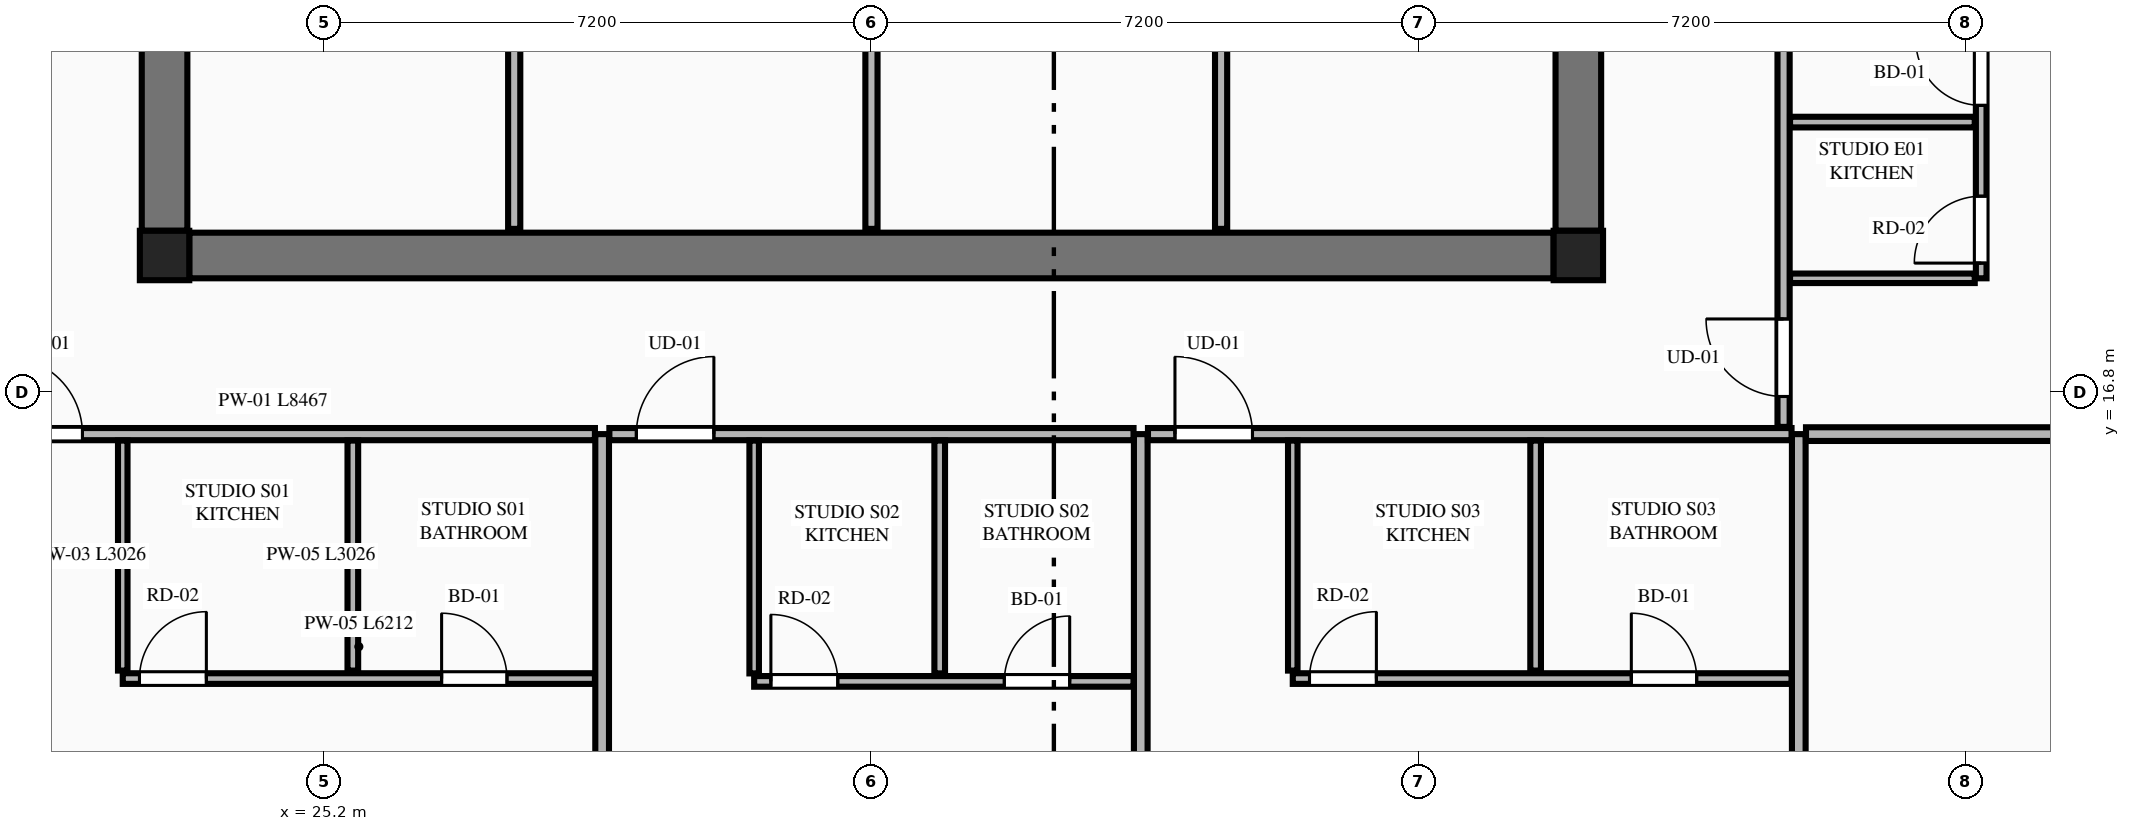
"""IFC4 building model, lengths in metres.
Left out: names, types, materials, properties, quantities, classifications, styles, units other than length and angle.
Written with IfcOpenShell. Run it as: python <this file> out.ifc"""

import sys

from ifc_helpers import new_model, si_unit, direction, frame, frame_2d, origin, origin_2d, place, context, subcontext, project, spatial, rectangle, extrude, element, fill, save


model = new_model("IFC4")
c1 = context("Model", 3, precision=1e-05, world=origin(), true_north=direction((0.0, 1.0)))
c2 = subcontext(c1, "Body", "Model", "MODEL_VIEW")
j1 = project(units=[si_unit("LENGTHUNIT", "METRE"), si_unit("PLANEANGLEUNIT", "RADIAN")], contexts=[c1])
p1 = place(None, origin())
s1 = spatial("IfcSite", under=j1, at=p1, CompositionType="ELEMENT")
p2 = place(p1, origin())
s2 = spatial("IfcBuilding", under=s1, at=p2, CompositionType="ELEMENT")
p3 = place(p2, frame((0.0, 0.0, 200.3)))
s3 = spatial("IfcBuildingStorey", under=s2, at=p3, CompositionType="ELEMENT", Elevation=200.3)
for number, where, z_axis, x_axis in (
    (1, (23.1, 18.6, 0.0), (0.0, 0.0, 1.0), (1.0, 0.0, 0.0)),
    (2, (41.7, 18.6, 0.0), (0.0, 0.0, 1.0), (1.0, 0.0, 0.0)),
):
    element("IfcColumn", number, at=place(p3, frame(where, z_axis=z_axis, x_axis=x_axis)), inside=s3, PredefinedType="COLUMN", context=c2, shape_type="SweptSolid", body=[
        extrude(rectangle(XDim=0.65, YDim=0.65, at=origin_2d()), origin(), (0.0, 0.0, 1.0), 3.55),
    ])
p4 = place(p3, frame((23.425, 18.6, 0.0), z_axis=(0.0, 0.0, 1.0), x_axis=(1.0, 0.0, 0.0)))
e3 = element("IfcWall", 3, at=p4, inside=s3, PredefinedType="SHEAR", context=c2, shape_type="SweptSolid", body=[
    extrude(rectangle(XDim=17.95, YDim=0.6, at=frame_2d((8.975, 0.0))), origin(), (0.0, 0.0, 1.0), 3.35),
])
p5 = place(p3, frame((23.1, 18.925, 0.0), z_axis=(0.0, 0.0, 1.0), x_axis=(0.0, 1.0, 0.0)))
e4 = element("IfcWall", 4, at=p5, inside=s3, PredefinedType="SHEAR", context=c2, shape_type="SweptSolid", body=[
    extrude(rectangle(XDim=13.95, YDim=0.6, at=frame_2d((6.975, 0.0))), origin(), (0.0, 0.0, 1.0), 3.35),
])
p6 = place(p5, frame((2.915, 0.0, 0.0)))
e5 = element("IfcOpeningElement", 5, at=p6, cuts=e4, PredefinedType="OPENING", context=c2, shape_type="SweptSolid", body=[
    extrude(rectangle(XDim=1.22, YDim=2.25, at=frame_2d((0.61, 1.125))), frame((0.0, 0.31, 0.0), z_axis=(0.0, -1.0, 0.0), x_axis=(1.0, 0.0, 0.0)), (0.0, 0.0, 1.0), 0.62),
])
p7 = place(p3, frame((41.7, 18.925, 0.0), z_axis=(0.0, 0.0, 1.0), x_axis=(0.0, 1.0, 0.0)))
e6 = element("IfcWall", 6, at=p7, inside=s3, PredefinedType="SHEAR", context=c2, shape_type="SweptSolid", body=[
    extrude(rectangle(XDim=13.95, YDim=0.6, at=frame_2d((6.975, 0.0))), origin(), (0.0, 0.0, 1.0), 3.35),
])
p8 = place(p7, frame((2.915, 0.0, 0.0)))
e7 = element("IfcOpeningElement", 7, at=p8, cuts=e6, PredefinedType="OPENING", context=c2, shape_type="SweptSolid", body=[
    extrude(rectangle(XDim=1.22, YDim=2.25, at=frame_2d((0.61, 1.125))), frame((0.0, 0.31, 0.0), z_axis=(0.0, -1.0, 0.0), x_axis=(1.0, 0.0, 0.0)), (0.0, 0.0, 1.0), 0.62),
])
for number, where, z_axis, x_axis in (
    (8, (27.7, 18.95, 0.0), (0.0, 0.0, 1.0), (0.0, 1.0, 0.0)),
    (9, (32.4, 18.95, 0.0), (0.0, 0.0, 1.0), (0.0, 1.0, 0.0)),
    (10, (37.0, 18.95, 0.0), (0.0, 0.0, 1.0), (0.0, 1.0, 0.0)),
):
    element("IfcWall", number, at=place(p3, frame(where, z_axis=z_axis, x_axis=x_axis)), inside=s3, PredefinedType="PARTITIONING", context=c2, shape_type="SweptSolid", body=[
        extrude(rectangle(XDim=2.73, YDim=0.16, at=frame_2d((1.365, 0.0))), origin(), (0.0, 0.0, 1.0), 3.35),
    ])
p9 = place(p3, frame((46.783, 8.249, 0.0), z_axis=(0.0, 0.0, 1.0), x_axis=(0.451522864045, 0.892259549259, 0.0)))
e11 = element("IfcWall", 11, at=p9, inside=s3, PredefinedType="STANDARD", context=c2, shape_type="SweptSolid", body=[
    extrude(rectangle(XDim=4.731, YDim=0.34, at=frame_2d((2.365, 0.0))), origin(), (0.0, 0.0, 1.0), 2.883),
])
p10 = place(p9, frame((1.815, 0.0, 0.75)))
e12 = element("IfcOpeningElement", 12, at=p10, cuts=e11, PredefinedType="OPENING", context=c2, shape_type="SweptSolid", body=[
    extrude(rectangle(XDim=1.1, YDim=1.983, at=frame_2d((0.55, 0.991))), frame((0.0, 0.18, 0.0), z_axis=(0.0, -1.0, 0.0), x_axis=(1.0, 0.0, 0.0)), (0.0, 0.0, 1.0), 0.36),
])
for number, where, z_axis, x_axis in (
    (13, (28.857, 5.755, 0.0), (0.0, 0.0, 1.0), (0.0, 1.0, 0.0)),
    (14, (35.943, 5.755, 0.0), (0.0, 0.0, 1.0), (0.0, 1.0, 0.0)),
):
    element("IfcWall", number, at=place(p3, frame(where, z_axis=z_axis, x_axis=x_axis)), inside=s3, PredefinedType="PARTITIONING", context=c2, shape_type="SweptSolid", body=[
        extrude(rectangle(XDim=10.495, YDim=0.18, at=frame_2d((5.248, 0.0))), origin(), (0.0, 0.0, 1.0), 2.807),
    ])
p11 = place(p3, frame((44.6, 5.968, 0.0), z_axis=(0.0, 0.0, 1.0), x_axis=(0.0, 1.0, 0.0)))
e15 = element("IfcWall", 15, at=p11, inside=s3, PredefinedType="PARTITIONING", context=c2, shape_type="SweptSolid", body=[
    extrude(rectangle(XDim=10.282, YDim=0.18, at=frame_2d((5.141, 0.0))), origin(), (0.0, 0.0, 1.0), 3.35),
])
p12 = place(p3, frame((20.295, 16.25, 0.0), z_axis=(0.0, 0.0, 1.0), x_axis=(1.0, 0.0, 0.0)))
e16 = element("IfcWall", 16, at=p12, inside=s3, PredefinedType="PARTITIONING", context=c2, shape_type="SweptSolid", body=[
    extrude(rectangle(XDim=8.467, YDim=0.16, at=frame_2d((4.233, 0.0))), origin(), (0.0, 0.0, 1.0), 3.35),
])
p13 = place(p12, frame((0.705, 0.0, 0.0)))
e17 = element("IfcOpeningElement", 17, at=p13, cuts=e16, PredefinedType="OPENING", context=c2, shape_type="SweptSolid", body=[
    extrude(rectangle(XDim=1.02, YDim=2.25, at=frame_2d((0.51, 1.125))), frame((0.0, 0.09, 0.0), z_axis=(0.0, -1.0, 0.0), x_axis=(1.0, 0.0, 0.0)), (0.0, 0.0, 1.0), 0.18),
])
p14 = place(p3, frame((22.55, 13.139, 0.0), z_axis=(0.0, 0.0, 1.0), x_axis=(0.0, 1.0, 0.0)))
e18 = element("IfcWall", 18, at=p14, inside=s3, PredefinedType="PARTITIONING", context=c2, shape_type="SweptSolid", body=[
    extrude(rectangle(XDim=3.026, YDim=0.125, at=frame_2d((1.513, 0.0))), origin(), (0.0, 0.0, 1.0), 2.807),
])
p15 = place(p3, frame((22.55, 13.034, 0.0), z_axis=(0.0, 0.0, 1.0), x_axis=(1.0, 0.0, 0.0)))
e19 = element("IfcWall", 19, at=p15, inside=s3, PredefinedType="PLUMBINGWALL", context=c2, shape_type="SweptSolid", body=[
    extrude(rectangle(XDim=6.212, YDim=0.14, at=frame_2d((3.106, 0.0))), origin(), (0.0, 0.0, 1.0), 3.35),
])
p16 = place(p15, frame((4.195, 0.0, 0.0)))
e20 = element("IfcOpeningElement", 20, at=p16, cuts=e19, PredefinedType="OPENING", context=c2, shape_type="SweptSolid", body=[
    extrude(rectangle(XDim=0.86, YDim=2.1, at=frame_2d((0.43, 1.05))), frame((0.0, 0.08, 0.0), z_axis=(0.0, -1.0, 0.0), x_axis=(1.0, 0.0, 0.0)), (0.0, 0.0, 1.0), 0.16),
])
p17 = place(p15, frame((0.22, 0.0, 0.0)))
e21 = element("IfcOpeningElement", 21, at=p17, cuts=e19, PredefinedType="OPENING", context=c2, shape_type="SweptSolid", body=[
    extrude(rectangle(XDim=0.88, YDim=2.15, at=frame_2d((0.44, 1.075))), frame((0.0, 0.08, 0.0), z_axis=(0.0, -1.0, 0.0), x_axis=(1.0, 0.0, 0.0)), (0.0, 0.0, 1.0), 0.16),
])
p18 = place(p3, frame((25.577, 13.139, 0.0), z_axis=(0.0, 0.0, 1.0), x_axis=(0.0, 1.0, 0.0)))
e22 = element("IfcWall", 22, at=p18, inside=s3, PredefinedType="PLUMBINGWALL", context=c2, shape_type="SweptSolid", body=[
    extrude(rectangle(XDim=3.026, YDim=0.14, at=frame_2d((1.513, 0.0))), origin(), (0.0, 0.0, 1.0), 3.35),
])
p19 = place(p3, frame((28.952, 16.25, 0.0), z_axis=(0.0, 0.0, 1.0), x_axis=(1.0, 0.0, 0.0)))
e23 = element("IfcWall", 23, at=p19, inside=s3, PredefinedType="PARTITIONING", context=c2, shape_type="SweptSolid", body=[
    extrude(rectangle(XDim=6.896, YDim=0.16, at=frame_2d((3.448, 0.0))), origin(), (0.0, 0.0, 1.0), 3.35),
])
p20 = place(p19, frame((0.355, 0.0, 0.0)))
e24 = element("IfcOpeningElement", 24, at=p20, cuts=e23, PredefinedType="OPENING", context=c2, shape_type="SweptSolid", body=[
    extrude(rectangle(XDim=1.02, YDim=2.25, at=frame_2d((0.51, 1.125))), frame((0.0, 0.09, 0.0), z_axis=(0.0, -1.0, 0.0), x_axis=(1.0, 0.0, 0.0)), (0.0, 0.0, 1.0), 0.18),
])
p21 = place(p3, frame((30.857, 13.102, 0.0), z_axis=(0.0, 0.0, 1.0), x_axis=(0.0, 1.0, 0.0)))
e25 = element("IfcWall", 25, at=p21, inside=s3, PredefinedType="PARTITIONING", context=c2, shape_type="SweptSolid", body=[
    extrude(rectangle(XDim=3.063, YDim=0.125, at=frame_2d((1.531, 0.0))), origin(), (0.0, 0.0, 1.0), 3.35),
])
p22 = place(p3, frame((30.857, 12.997, 0.0), z_axis=(0.0, 0.0, 1.0), x_axis=(1.0, 0.0, 0.0)))
e26 = element("IfcWall", 26, at=p22, inside=s3, PredefinedType="PLUMBINGWALL", context=c2, shape_type="SweptSolid", body=[
    extrude(rectangle(XDim=4.991, YDim=0.14, at=frame_2d((2.496, 0.0))), origin(), (0.0, 0.0, 1.0), 3.35),
])
p23 = place(p22, frame((3.291, 0.0, 0.0)))
e27 = element("IfcOpeningElement", 27, at=p23, cuts=e26, PredefinedType="OPENING", context=c2, shape_type="SweptSolid", body=[
    extrude(rectangle(XDim=0.86, YDim=2.1, at=frame_2d((0.43, 1.05))), frame((0.0, 0.08, 0.0), z_axis=(0.0, -1.0, 0.0), x_axis=(1.0, 0.0, 0.0)), (0.0, 0.0, 1.0), 0.16),
])
p24 = place(p22, frame((0.22, 0.0, 0.0)))
e28 = element("IfcOpeningElement", 28, at=p24, cuts=e26, PredefinedType="OPENING", context=c2, shape_type="SweptSolid", body=[
    extrude(rectangle(XDim=0.88, YDim=2.15, at=frame_2d((0.44, 1.075))), frame((0.0, 0.08, 0.0), z_axis=(0.0, -1.0, 0.0), x_axis=(1.0, 0.0, 0.0)), (0.0, 0.0, 1.0), 0.16),
])
p25 = place(p3, frame((33.298, 13.102, 0.0), z_axis=(0.0, 0.0, 1.0), x_axis=(0.0, 1.0, 0.0)))
e29 = element("IfcWall", 29, at=p25, inside=s3, PredefinedType="PLUMBINGWALL", context=c2, shape_type="SweptSolid", body=[
    extrude(rectangle(XDim=3.063, YDim=0.14, at=frame_2d((1.531, 0.0))), origin(), (0.0, 0.0, 1.0), 3.35),
])
p26 = place(p3, frame((36.038, 16.25, 0.0), z_axis=(0.0, 0.0, 1.0), x_axis=(1.0, 0.0, 0.0)))
e30 = element("IfcWall", 30, at=p26, inside=s3, PredefinedType="PARTITIONING", context=c2, shape_type="SweptSolid", body=[
    extrude(rectangle(XDim=8.467, YDim=0.16, at=frame_2d((4.233, 0.0))), origin(), (0.0, 0.0, 1.0), 3.35),
])
p27 = place(p26, frame((0.355, 0.0, 0.0)))
e31 = element("IfcOpeningElement", 31, at=p27, cuts=e30, PredefinedType="OPENING", context=c2, shape_type="SweptSolid", body=[
    extrude(rectangle(XDim=1.02, YDim=2.25, at=frame_2d((0.51, 1.125))), frame((0.0, 0.09, 0.0), z_axis=(0.0, -1.0, 0.0), x_axis=(1.0, 0.0, 0.0)), (0.0, 0.0, 1.0), 0.18),
])
p28 = place(p3, frame((37.943, 13.139, 0.0), z_axis=(0.0, 0.0, 1.0), x_axis=(0.0, 1.0, 0.0)))
e32 = element("IfcWall", 32, at=p28, inside=s3, PredefinedType="PARTITIONING", context=c2, shape_type="SweptSolid", body=[
    extrude(rectangle(XDim=3.026, YDim=0.125, at=frame_2d((1.513, 0.0))), origin(), (0.0, 0.0, 1.0), 3.35),
])
p29 = place(p3, frame((37.943, 13.034, 0.0), z_axis=(0.0, 0.0, 1.0), x_axis=(1.0, 0.0, 0.0)))
e33 = element("IfcWall", 33, at=p29, inside=s3, PredefinedType="PLUMBINGWALL", context=c2, shape_type="SweptSolid", body=[
    extrude(rectangle(XDim=6.562, YDim=0.14, at=frame_2d((3.281, 0.0))), origin(), (0.0, 0.0, 1.0), 3.35),
])
p30 = place(p29, frame((4.454, 0.0, 0.0)))
e34 = element("IfcOpeningElement", 34, at=p30, cuts=e33, PredefinedType="OPENING", context=c2, shape_type="SweptSolid", body=[
    extrude(rectangle(XDim=0.86, YDim=2.1, at=frame_2d((0.43, 1.05))), frame((0.0, 0.08, 0.0), z_axis=(0.0, -1.0, 0.0), x_axis=(1.0, 0.0, 0.0)), (0.0, 0.0, 1.0), 0.16),
])
p31 = place(p29, frame((0.22, 0.0, 0.0)))
e35 = element("IfcOpeningElement", 35, at=p31, cuts=e33, PredefinedType="OPENING", context=c2, shape_type="SweptSolid", body=[
    extrude(rectangle(XDim=0.88, YDim=2.15, at=frame_2d((0.44, 1.075))), frame((0.0, 0.08, 0.0), z_axis=(0.0, -1.0, 0.0), x_axis=(1.0, 0.0, 0.0)), (0.0, 0.0, 1.0), 0.16),
])
p32 = place(p3, frame((41.138, 13.139, 0.0), z_axis=(0.0, 0.0, 1.0), x_axis=(0.0, 1.0, 0.0)))
e36 = element("IfcWall", 36, at=p32, inside=s3, PredefinedType="PLUMBINGWALL", context=c2, shape_type="SweptSolid", body=[
    extrude(rectangle(XDim=3.026, YDim=0.14, at=frame_2d((1.513, 0.0))), origin(), (0.0, 0.0, 1.0), 3.35),
])
p33 = place(p3, frame((44.695, 16.25, 0.0), z_axis=(0.0, 0.0, 1.0), x_axis=(1.0, 0.0, 0.0)))
e37 = element("IfcWall", 37, at=p33, inside=s3, PredefinedType="PARTITIONING", context=c2, shape_type="SweptSolid", body=[
    extrude(rectangle(XDim=5.894, YDim=0.18, at=frame_2d((2.947, 0.0))), origin(), (0.0, 0.0, 1.0), 3.35),
])
p34 = place(p3, frame((44.4, 16.345, 0.0), z_axis=(0.0, 0.0, 1.0), x_axis=(0.0, 1.0, 0.0)))
e38 = element("IfcWall", 38, at=p34, inside=s3, PredefinedType="PARTITIONING", context=c2, shape_type="SweptSolid", body=[
    extrude(rectangle(XDim=6.236, YDim=0.16, at=frame_2d((3.118, 0.0))), origin(), (0.0, 0.0, 1.0), 3.35),
])
p35 = place(p34, frame((0.4, 0.0, 0.0)))
e39 = element("IfcOpeningElement", 39, at=p35, cuts=e38, PredefinedType="OPENING", context=c2, shape_type="SweptSolid", body=[
    extrude(rectangle(XDim=1.02, YDim=2.25, at=frame_2d((0.51, 1.125))), frame((0.0, 0.09, 0.0), z_axis=(0.0, -1.0, 0.0), x_axis=(1.0, 0.0, 0.0)), (0.0, 0.0, 1.0), 0.18),
])
p36 = place(p3, frame((44.485, 18.3, 0.0), z_axis=(0.0, 0.0, 1.0), x_axis=(1.0, 0.0, 0.0)))
e40 = element("IfcWall", 40, at=p36, inside=s3, PredefinedType="PARTITIONING", context=c2, shape_type="SweptSolid", body=[
    extrude(rectangle(XDim=2.43, YDim=0.125, at=frame_2d((1.215, 0.0))), origin(), (0.0, 0.0, 1.0), 2.807),
])
p37 = place(p3, frame((47.0, 18.3, 0.0), z_axis=(0.0, 0.0, 1.0), x_axis=(0.0, 1.0, 0.0)))
e41 = element("IfcWall", 41, at=p37, inside=s3, PredefinedType="PLUMBINGWALL", context=c2, shape_type="SweptSolid", body=[
    extrude(rectangle(XDim=4.281, YDim=0.14, at=frame_2d((2.141, 0.0))), origin(), (0.0, 0.0, 1.0), 3.35),
])
p38 = place(p37, frame((2.275, 0.0, 0.0)))
e42 = element("IfcOpeningElement", 42, at=p38, cuts=e41, PredefinedType="OPENING", context=c2, shape_type="SweptSolid", body=[
    extrude(rectangle(XDim=0.86, YDim=2.1, at=frame_2d((0.43, 1.05))), frame((0.0, 0.08, 0.0), z_axis=(0.0, -1.0, 0.0), x_axis=(1.0, 0.0, 0.0)), (0.0, 0.0, 1.0), 0.16),
])
p39 = place(p37, frame((0.2, 0.0, 0.0)))
e43 = element("IfcOpeningElement", 43, at=p39, cuts=e41, PredefinedType="OPENING", context=c2, shape_type="SweptSolid", body=[
    extrude(rectangle(XDim=0.88, YDim=2.15, at=frame_2d((0.44, 1.075))), frame((0.0, 0.08, 0.0), z_axis=(0.0, -1.0, 0.0), x_axis=(1.0, 0.0, 0.0)), (0.0, 0.0, 1.0), 0.16),
])
p40 = place(p3, frame((44.485, 20.355, 0.0), z_axis=(0.0, 0.0, 1.0), x_axis=(1.0, 0.0, 0.0)))
e44 = element("IfcWall", 44, at=p40, inside=s3, PredefinedType="PLUMBINGWALL", context=c2, shape_type="SweptSolid", body=[
    extrude(rectangle(XDim=2.43, YDim=0.14, at=frame_2d((1.215, 0.0))), origin(), (0.0, 0.0, 1.0), 3.35),
])
p41 = place(p16, origin())
e45 = element("IfcDoor", 45, at=p41, inside=s3, OperationType="SINGLE_SWING_LEFT", PredefinedType="DOOR", context=c2, shape_type="SweptSolid", body=[
    extrude(rectangle(XDim=0.86, YDim=2.1, at=frame_2d((0.43, 1.05))), frame((0.0, 0.025, 0.0), z_axis=(0.0, -1.0, 0.0), x_axis=(1.0, 0.0, 0.0)), (0.0, 0.0, 1.0), 0.05),
])
fill(e20, e45)
p42 = place(p13, origin())
e46 = element("IfcDoor", 46, at=p42, inside=s3, OperationType="SINGLE_SWING_LEFT", PredefinedType="DOOR", context=c2, shape_type="SweptSolid", body=[
    extrude(rectangle(XDim=1.02, YDim=2.25, at=frame_2d((0.51, 1.125))), frame((0.0, 0.025, 0.0), z_axis=(0.0, -1.0, 0.0), x_axis=(1.0, 0.0, 0.0)), (0.0, 0.0, 1.0), 0.05),
])
fill(e17, e46)
p43 = place(p17, origin())
e47 = element("IfcDoor", 47, at=p43, inside=s3, OperationType="SINGLE_SWING_RIGHT", PredefinedType="DOOR", context=c2, shape_type="SweptSolid", body=[
    extrude(rectangle(XDim=0.88, YDim=2.15, at=frame_2d((0.44, 1.075))), frame((0.0, 0.025, 0.0), z_axis=(0.0, -1.0, 0.0), x_axis=(1.0, 0.0, 0.0)), (0.0, 0.0, 1.0), 0.05),
])
fill(e21, e47)
p44 = place(p23, origin())
e48 = element("IfcDoor", 48, at=p44, inside=s3, OperationType="SINGLE_SWING_RIGHT", PredefinedType="DOOR", context=c2, shape_type="SweptSolid", body=[
    extrude(rectangle(XDim=0.86, YDim=2.1, at=frame_2d((0.43, 1.05))), frame((0.0, 0.025, 0.0), z_axis=(0.0, -1.0, 0.0), x_axis=(1.0, 0.0, 0.0)), (0.0, 0.0, 1.0), 0.05),
])
fill(e27, e48)
p45 = place(p20, origin())
e49 = element("IfcDoor", 49, at=p45, inside=s3, OperationType="SINGLE_SWING_RIGHT", PredefinedType="DOOR", context=c2, shape_type="SweptSolid", body=[
    extrude(rectangle(XDim=1.02, YDim=2.25, at=frame_2d((0.51, 1.125))), frame((0.0, 0.025, 0.0), z_axis=(0.0, -1.0, 0.0), x_axis=(1.0, 0.0, 0.0)), (0.0, 0.0, 1.0), 0.05),
])
fill(e24, e49)
p46 = place(p24, origin())
e50 = element("IfcDoor", 50, at=p46, inside=s3, OperationType="SINGLE_SWING_LEFT", PredefinedType="DOOR", context=c2, shape_type="SweptSolid", body=[
    extrude(rectangle(XDim=0.88, YDim=2.15, at=frame_2d((0.44, 1.075))), frame((0.0, 0.025, 0.0), z_axis=(0.0, -1.0, 0.0), x_axis=(1.0, 0.0, 0.0)), (0.0, 0.0, 1.0), 0.05),
])
fill(e28, e50)
p47 = place(p30, origin())
e51 = element("IfcDoor", 51, at=p47, inside=s3, OperationType="SINGLE_SWING_LEFT", PredefinedType="DOOR", context=c2, shape_type="SweptSolid", body=[
    extrude(rectangle(XDim=0.86, YDim=2.1, at=frame_2d((0.43, 1.05))), frame((0.0, 0.025, 0.0), z_axis=(0.0, -1.0, 0.0), x_axis=(1.0, 0.0, 0.0)), (0.0, 0.0, 1.0), 0.05),
])
fill(e34, e51)
p48 = place(p27, origin())
e52 = element("IfcDoor", 52, at=p48, inside=s3, OperationType="SINGLE_SWING_LEFT", PredefinedType="DOOR", context=c2, shape_type="SweptSolid", body=[
    extrude(rectangle(XDim=1.02, YDim=2.25, at=frame_2d((0.51, 1.125))), frame((0.0, 0.025, 0.0), z_axis=(0.0, -1.0, 0.0), x_axis=(1.0, 0.0, 0.0)), (0.0, 0.0, 1.0), 0.05),
])
fill(e31, e52)
p49 = place(p31, origin())
e53 = element("IfcDoor", 53, at=p49, inside=s3, OperationType="SINGLE_SWING_RIGHT", PredefinedType="DOOR", context=c2, shape_type="SweptSolid", body=[
    extrude(rectangle(XDim=0.88, YDim=2.15, at=frame_2d((0.44, 1.075))), frame((0.0, 0.025, 0.0), z_axis=(0.0, -1.0, 0.0), x_axis=(1.0, 0.0, 0.0)), (0.0, 0.0, 1.0), 0.05),
])
fill(e35, e53)
p50 = place(p38, origin())
e54 = element("IfcDoor", 54, at=p50, inside=s3, OperationType="SINGLE_SWING_RIGHT", PredefinedType="DOOR", context=c2, shape_type="SweptSolid", body=[
    extrude(rectangle(XDim=0.86, YDim=2.1, at=frame_2d((0.43, 1.05))), frame((0.0, 0.025, 0.0), z_axis=(0.0, -1.0, 0.0), x_axis=(1.0, 0.0, 0.0)), (0.0, 0.0, 1.0), 0.05),
])
fill(e42, e54)
p51 = place(p35, origin())
e55 = element("IfcDoor", 55, at=p51, inside=s3, OperationType="SINGLE_SWING_RIGHT", PredefinedType="DOOR", context=c2, shape_type="SweptSolid", body=[
    extrude(rectangle(XDim=1.02, YDim=2.25, at=frame_2d((0.51, 1.125))), frame((0.0, 0.025, 0.0), z_axis=(0.0, -1.0, 0.0), x_axis=(1.0, 0.0, 0.0)), (0.0, 0.0, 1.0), 0.05),
])
fill(e39, e55)
p52 = place(p39, origin())
e56 = element("IfcDoor", 56, at=p52, inside=s3, OperationType="SINGLE_SWING_LEFT", PredefinedType="DOOR", context=c2, shape_type="SweptSolid", body=[
    extrude(rectangle(XDim=0.88, YDim=2.15, at=frame_2d((0.44, 1.075))), frame((0.0, 0.025, 0.0), z_axis=(0.0, -1.0, 0.0), x_axis=(1.0, 0.0, 0.0)), (0.0, 0.0, 1.0), 0.05),
])
fill(e43, e56)
save(model, sys.argv[1])
